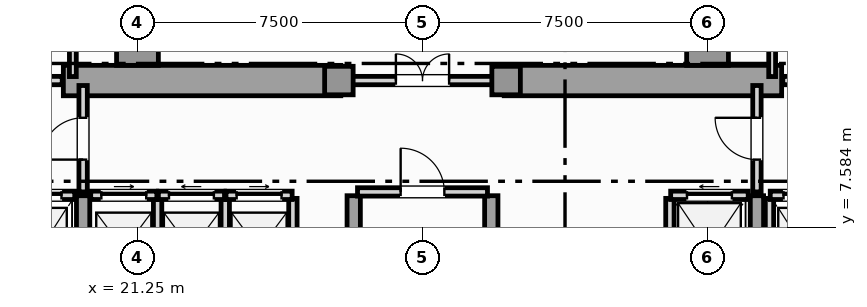
"""IFC4 building model, lengths in metres.
Left out: names, types, materials, properties, quantities, classifications, styles, units other than length and angle.
Written with IfcOpenShell. Run it as: python <this file> out.ifc"""

import sys

from ifc_helpers import new_model, si_unit, direction, frame, frame_2d, origin, origin_2d, place, context, subcontext, project, spatial, rectangle, extrude, element, fill, save


model = new_model("IFC4")
c1 = context("Model", 3, precision=1e-05, world=origin(), true_north=direction((0.0, 1.0)))
c2 = subcontext(c1, "Body", "Model", "MODEL_VIEW")
j1 = project(units=[si_unit("LENGTHUNIT", "METRE"), si_unit("PLANEANGLEUNIT", "RADIAN")], contexts=[c1])
p1 = place(None, origin())
s1 = spatial("IfcSite", under=j1, at=p1, CompositionType="ELEMENT")
p2 = place(p1, origin())
s2 = spatial("IfcBuilding", under=s1, at=p2, CompositionType="ELEMENT")
p3 = place(p2, origin())
s3 = spatial("IfcBuildingStorey", under=s2, at=p3, CompositionType="ELEMENT", Elevation=0.0)
for number, where, z_axis, x_axis in (
    (1, (19.3, 11.45, 0.0), (0.0, 0.0, 1.0), (1.0, 0.0, 0.0)),
    (2, (30.9, 11.45, 0.0), (0.0, 0.0, 1.0), (1.0, 0.0, 0.0)),
):
    element("IfcWall", number, at=place(p3, frame(where, z_axis=z_axis, x_axis=x_axis)), inside=s3, PredefinedType="SHEAR", context=c2, shape_type="SweptSolid", body=[
        extrude(rectangle(XDim=7.3, YDim=0.8, at=frame_2d((3.65, 0.0))), origin(), (0.0, 0.0, 1.0), 5.1),
    ])
for number, where, z_axis, x_axis in (
    (3, (19.82, 0.92, 0.0), (0.0, 0.0, 1.0), (0.0, 1.0, 0.0)),
    (4, (26.94, 0.92, 0.0), (0.0, 0.0, 1.0), (0.0, 1.0, 0.0)),
    (5, (30.56, 0.92, 0.0), (0.0, 0.0, 1.0), (0.0, 1.0, 0.0)),
    (6, (37.55, 0.92, 0.0), (0.0, 0.0, 1.0), (0.0, 1.0, 0.0)),
):
    element("IfcWall", number, at=place(p3, frame(where, z_axis=z_axis, x_axis=x_axis)), inside=s3, PredefinedType="SHEAR", context=c2, shape_type="SweptSolid", body=[
        extrude(rectangle(XDim=7.5, YDim=0.35, at=frame_2d((3.75, 0.0))), origin(), (0.0, 0.0, 1.0), 5.1),
    ])
for number, where, z_axis, x_axis in (
    (7, (26.55, 11.45, 0.0), (0.0, 0.0, 1.0), (1.0, 0.0, 0.0)),
    (8, (30.95, 11.45, 0.0), (0.0, 0.0, 1.0), (1.0, 0.0, 0.0)),
):
    element("IfcColumn", number, at=place(p3, frame(where, z_axis=z_axis, x_axis=x_axis)), inside=s3, PredefinedType="COLUMN", context=c2, shape_type="SweptSolid", body=[
        extrude(rectangle(XDim=0.75, YDim=0.75, at=origin_2d()), origin(), (0.0, 0.0, 1.0), 5.4),
    ])
for number, where, z_axis, x_axis in (
    (9, (21.25, 12.4, 0.0), (0.0, 0.0, 1.0), (1.0, 0.0, 0.0)),
    (10, (36.25, 12.4, 0.0), (0.0, 0.0, 1.0), (1.0, 0.0, 0.0)),
):
    element("IfcColumn", number, at=place(p3, frame(where, z_axis=z_axis, x_axis=x_axis)), inside=s3, PredefinedType="COLUMN", context=c2, shape_type="SweptSolid", body=[
        extrude(rectangle(XDim=1.1, YDim=1.1, at=origin_2d()), origin(), (0.0, 0.0, 1.0), 5.4),
    ])
p4 = place(p3, frame((17.78, 8.43, 0.0), z_axis=(0.0, 0.0, 1.0), x_axis=(1.0, 0.0, 0.0)))
e11 = element("IfcWall", 11, at=p4, inside=s3, PredefinedType="SOLIDWALL", context=c2, shape_type="SweptSolid", body=[
    extrude(rectangle(XDim=1.82, YDim=0.22, at=frame_2d((0.91, 0.0))), origin(), (0.0, 0.0, 1.0), 5.1),
])
p5 = place(p4, frame((0.35, 0.0, 0.0)))
e12 = element("IfcOpeningElement", 12, at=p5, cuts=e11, PredefinedType="OPENING", context=c2, shape_type="SweptSolid", body=[
    extrude(rectangle(XDim=1.12, YDim=2.25, at=frame_2d((0.56, 1.125))), frame((0.0, 0.12, 0.0), z_axis=(0.0, -1.0, 0.0), x_axis=(1.0, 0.0, 0.0)), (0.0, 0.0, 1.0), 0.24),
])
p6 = place(p3, frame((37.88, 5.65, 0.0), z_axis=(0.0, 0.0, 1.0), x_axis=(0.0, 1.0, 0.0)))
e13 = element("IfcWall", 13, at=p6, inside=s3, PredefinedType="SOLIDWALL", context=c2, shape_type="SweptSolid", body=[
    extrude(rectangle(XDim=2.7, YDim=0.22, at=frame_2d((1.35, 0.0))), origin(), (0.0, 0.0, 1.0), 5.1),
])
p7 = place(p3, frame((37.9, 8.43, 0.0), z_axis=(0.0, 0.0, 1.0), x_axis=(1.0, 0.0, 0.0)))
e14 = element("IfcWall", 14, at=p7, inside=s3, PredefinedType="SOLIDWALL", context=c2, shape_type="SweptSolid", body=[
    extrude(rectangle(XDim=1.82, YDim=0.22, at=frame_2d((0.91, 0.0))), origin(), (0.0, 0.0, 1.0), 5.1),
])
p8 = place(p7, frame((0.35, 0.0, 0.0)))
e15 = element("IfcOpeningElement", 15, at=p8, cuts=e14, PredefinedType="OPENING", context=c2, shape_type="SweptSolid", body=[
    extrude(rectangle(XDim=1.12, YDim=2.25, at=frame_2d((0.56, 1.125))), frame((0.0, 0.12, 0.0), z_axis=(0.0, -1.0, 0.0), x_axis=(1.0, 0.0, 0.0)), (0.0, 0.0, 1.0), 0.24),
])
p9 = place(p3, frame((35.26, 5.65, 0.0), z_axis=(0.0, 0.0, 1.0), x_axis=(0.0, 1.0, 0.0)))
e16 = element("IfcWall", 16, at=p9, inside=s3, PredefinedType="SOLIDWALL", context=c2, shape_type="SweptSolid", body=[
    extrude(rectangle(XDim=2.7, YDim=0.22, at=frame_2d((1.35, 0.0))), origin(), (0.0, 0.0, 1.0), 5.1),
])
p10 = place(p3, frame((35.28, 8.43, 0.0), z_axis=(0.0, 0.0, 1.0), x_axis=(1.0, 0.0, 0.0)))
e17 = element("IfcWall", 17, at=p10, inside=s3, PredefinedType="SOLIDWALL", context=c2, shape_type="SweptSolid", body=[
    extrude(rectangle(XDim=2.04, YDim=0.22, at=frame_2d((1.02, 0.0))), origin(), (0.0, 0.0, 1.0), 5.1),
])
p11 = place(p10, frame((0.43, 0.0, 0.0)))
e18 = element("IfcOpeningElement", 18, at=p11, cuts=e17, PredefinedType="OPENING", context=c2, shape_type="SweptSolid", body=[
    extrude(rectangle(XDim=1.18, YDim=2.2, at=frame_2d((0.59, 1.1))), frame((0.0, 0.12, 0.0), z_axis=(0.0, -1.0, 0.0), x_axis=(1.0, 0.0, 0.0)), (0.0, 0.0, 1.0), 0.24),
])
p12 = place(p3, frame((21.78, 5.65, 0.0), z_axis=(0.0, 0.0, 1.0), x_axis=(0.0, 1.0, 0.0)))
e19 = element("IfcWall", 19, at=p12, inside=s3, PredefinedType="SOLIDWALL", context=c2, shape_type="SweptSolid", body=[
    extrude(rectangle(XDim=2.7, YDim=0.22, at=frame_2d((1.35, 0.0))), origin(), (0.0, 0.0, 1.0), 5.1),
])
p13 = place(p3, frame((20.02, 8.43, 0.0), z_axis=(0.0, 0.0, 1.0), x_axis=(1.0, 0.0, 0.0)))
e20 = element("IfcWall", 20, at=p13, inside=s3, PredefinedType="SOLIDWALL", context=c2, shape_type="SweptSolid", body=[
    extrude(rectangle(XDim=1.74, YDim=0.22, at=frame_2d((0.87, 0.0))), origin(), (0.0, 0.0, 1.0), 5.1),
])
p14 = place(p13, frame((0.28, 0.0, 0.0)))
e21 = element("IfcOpeningElement", 21, at=p14, cuts=e20, PredefinedType="OPENING", context=c2, shape_type="SweptSolid", body=[
    extrude(rectangle(XDim=1.18, YDim=2.2, at=frame_2d((0.59, 1.1))), frame((0.0, 0.12, 0.0), z_axis=(0.0, -1.0, 0.0), x_axis=(1.0, 0.0, 0.0)), (0.0, 0.0, 1.0), 0.24),
])
p15 = place(p3, frame((23.56, 5.65, 0.0), z_axis=(0.0, 0.0, 1.0), x_axis=(0.0, 1.0, 0.0)))
e22 = element("IfcWall", 22, at=p15, inside=s3, PredefinedType="SOLIDWALL", context=c2, shape_type="SweptSolid", body=[
    extrude(rectangle(XDim=2.7, YDim=0.22, at=frame_2d((1.35, 0.0))), origin(), (0.0, 0.0, 1.0), 5.1),
])
p16 = place(p3, frame((21.8, 8.43, 0.0), z_axis=(0.0, 0.0, 1.0), x_axis=(1.0, 0.0, 0.0)))
e23 = element("IfcWall", 23, at=p16, inside=s3, PredefinedType="SOLIDWALL", context=c2, shape_type="SweptSolid", body=[
    extrude(rectangle(XDim=1.74, YDim=0.22, at=frame_2d((0.87, 0.0))), origin(), (0.0, 0.0, 1.0), 5.1),
])
p17 = place(p16, frame((0.28, 0.0, 0.0)))
e24 = element("IfcOpeningElement", 24, at=p17, cuts=e23, PredefinedType="OPENING", context=c2, shape_type="SweptSolid", body=[
    extrude(rectangle(XDim=1.18, YDim=2.2, at=frame_2d((0.59, 1.1))), frame((0.0, 0.12, 0.0), z_axis=(0.0, -1.0, 0.0), x_axis=(1.0, 0.0, 0.0)), (0.0, 0.0, 1.0), 0.24),
])
p18 = place(p3, frame((25.34, 5.65, 0.0), z_axis=(0.0, 0.0, 1.0), x_axis=(0.0, 1.0, 0.0)))
e25 = element("IfcWall", 25, at=p18, inside=s3, PredefinedType="SOLIDWALL", context=c2, shape_type="SweptSolid", body=[
    extrude(rectangle(XDim=2.7, YDim=0.22, at=frame_2d((1.35, 0.0))), origin(), (0.0, 0.0, 1.0), 5.1),
])
p19 = place(p3, frame((23.58, 8.43, 0.0), z_axis=(0.0, 0.0, 1.0), x_axis=(1.0, 0.0, 0.0)))
e26 = element("IfcWall", 26, at=p19, inside=s3, PredefinedType="SOLIDWALL", context=c2, shape_type="SweptSolid", body=[
    extrude(rectangle(XDim=1.74, YDim=0.22, at=frame_2d((0.87, 0.0))), origin(), (0.0, 0.0, 1.0), 5.1),
])
p20 = place(p19, frame((0.28, 0.0, 0.0)))
e27 = element("IfcOpeningElement", 27, at=p20, cuts=e26, PredefinedType="OPENING", context=c2, shape_type="SweptSolid", body=[
    extrude(rectangle(XDim=1.18, YDim=2.2, at=frame_2d((0.59, 1.1))), frame((0.0, 0.12, 0.0), z_axis=(0.0, -1.0, 0.0), x_axis=(1.0, 0.0, 0.0)), (0.0, 0.0, 1.0), 0.24),
])
p21 = place(p3, frame((27.04, 8.52, 0.0), z_axis=(0.0, 0.0, 1.0), x_axis=(1.0, 0.0, 0.0)))
e28 = element("IfcWall", 28, at=p21, inside=s3, PredefinedType="SOLIDWALL", context=c2, shape_type="SweptSolid", body=[
    extrude(rectangle(XDim=3.42, YDim=0.22, at=frame_2d((1.71, 0.0))), origin(), (0.0, 0.0, 1.0), 5.1),
])
p22 = place(p21, frame((1.135, 0.0, 0.0)))
e29 = element("IfcOpeningElement", 29, at=p22, cuts=e28, PredefinedType="OPENING", context=c2, shape_type="SweptSolid", body=[
    extrude(rectangle(XDim=1.15, YDim=2.2, at=frame_2d((0.575, 1.1))), frame((0.0, 0.12, 0.0), z_axis=(0.0, -1.0, 0.0), x_axis=(1.0, 0.0, 0.0)), (0.0, 0.0, 1.0), 0.24),
])
p23 = place(p3, frame((19.82, 8.52, 0.0), z_axis=(0.0, 0.0, 1.0), x_axis=(0.0, 1.0, 0.0)))
e30 = element("IfcWall", 30, at=p23, inside=s3, PredefinedType="SOLIDWALL", context=c2, shape_type="SweptSolid", body=[
    extrude(rectangle(XDim=2.8, YDim=0.22, at=frame_2d((1.4, 0.0))), origin(), (0.0, 0.0, 1.0), 4.555),
])
p24 = place(p23, frame((0.85, 0.0, 0.0)))
e31 = element("IfcOpeningElement", 31, at=p24, cuts=e30, PredefinedType="OPENING", context=c2, shape_type="SweptSolid", body=[
    extrude(rectangle(XDim=1.1, YDim=2.2, at=frame_2d((0.55, 1.1))), frame((0.0, 0.12, 0.0), z_axis=(0.0, -1.0, 0.0), x_axis=(1.0, 0.0, 0.0)), (0.0, 0.0, 1.0), 0.24),
])
p25 = place(p3, frame((37.55, 8.52, 0.0), z_axis=(0.0, 0.0, 1.0), x_axis=(0.0, 1.0, 0.0)))
e32 = element("IfcWall", 32, at=p25, inside=s3, PredefinedType="SOLIDWALL", context=c2, shape_type="SweptSolid", body=[
    extrude(rectangle(XDim=2.8, YDim=0.22, at=frame_2d((1.4, 0.0))), origin(), (0.0, 0.0, 1.0), 4.555),
])
p26 = place(p25, frame((0.85, 0.0, 0.0)))
e33 = element("IfcOpeningElement", 33, at=p26, cuts=e32, PredefinedType="OPENING", context=c2, shape_type="SweptSolid", body=[
    extrude(rectangle(XDim=1.1, YDim=2.2, at=frame_2d((0.55, 1.1))), frame((0.0, 0.12, 0.0), z_axis=(0.0, -1.0, 0.0), x_axis=(1.0, 0.0, 0.0)), (0.0, 0.0, 1.0), 0.24),
])
p27 = place(p3, frame((16.23, 11.45, 0.0), z_axis=(0.0, 0.0, 1.0), x_axis=(1.0, 0.0, 0.0)))
e34 = element("IfcWall", 34, at=p27, inside=s3, PredefinedType="SOLIDWALL", context=c2, shape_type="SweptSolid", body=[
    extrude(rectangle(XDim=3.04, YDim=0.22, at=frame_2d((1.52, 0.0))), origin(), (0.0, 0.0, 1.0), 5.1),
])
p28 = place(p27, frame((0.97, 0.0, 0.0)))
e35 = element("IfcOpeningElement", 35, at=p28, cuts=e34, PredefinedType="OPENING", context=c2, shape_type="SweptSolid", body=[
    extrude(rectangle(XDim=1.1, YDim=2.2, at=frame_2d((0.55, 1.1))), frame((0.0, 0.12, 0.0), z_axis=(0.0, -1.0, 0.0), x_axis=(1.0, 0.0, 0.0)), (0.0, 0.0, 1.0), 0.24),
])
p29 = place(p3, frame((26.63, 11.45, 0.0), z_axis=(0.0, 0.0, 1.0), x_axis=(1.0, 0.0, 0.0)))
e36 = element("IfcWall", 36, at=p29, inside=s3, PredefinedType="SOLIDWALL", context=c2, shape_type="SweptSolid", body=[
    extrude(rectangle(XDim=4.24, YDim=0.22, at=frame_2d((2.12, 0.0))), origin(), (0.0, 0.0, 1.0), 5.1),
])
p30 = place(p29, frame((1.42, 0.0, 0.0)))
e37 = element("IfcOpeningElement", 37, at=p30, cuts=e36, PredefinedType="OPENING", context=c2, shape_type="SweptSolid", body=[
    extrude(rectangle(XDim=1.4, YDim=2.2, at=frame_2d((0.7, 1.1))), frame((0.0, 0.12, 0.0), z_axis=(0.0, -1.0, 0.0), x_axis=(1.0, 0.0, 0.0)), (0.0, 0.0, 1.0), 0.24),
])
p31 = place(p3, frame((38.23, 11.45, 0.0), z_axis=(0.0, 0.0, 1.0), x_axis=(1.0, 0.0, 0.0)))
e38 = element("IfcWall", 38, at=p31, inside=s3, PredefinedType="SOLIDWALL", context=c2, shape_type="SweptSolid", body=[
    extrude(rectangle(XDim=3.04, YDim=0.22, at=frame_2d((1.52, 0.0))), origin(), (0.0, 0.0, 1.0), 5.1),
])
p32 = place(p31, frame((0.97, 0.0, 0.0)))
e39 = element("IfcOpeningElement", 39, at=p32, cuts=e38, PredefinedType="OPENING", context=c2, shape_type="SweptSolid", body=[
    extrude(rectangle(XDim=1.1, YDim=2.2, at=frame_2d((0.55, 1.1))), frame((0.0, 0.12, 0.0), z_axis=(0.0, -1.0, 0.0), x_axis=(1.0, 0.0, 0.0)), (0.0, 0.0, 1.0), 0.24),
])
for number, where, z_axis, x_axis in (
    (40, (19.55, 11.555, 0.0), (0.0, 0.0, 1.0), (0.0, 1.0, 0.0)),
    (41, (37.95, 11.555, 0.0), (0.0, 0.0, 1.0), (0.0, 1.0, 0.0)),
):
    element("IfcWall", number, at=place(p3, frame(where, z_axis=z_axis, x_axis=x_axis)), inside=s3, PredefinedType="PARTITIONING", context=c2, shape_type="SweptSolid", body=[
        extrude(rectangle(XDim=3.39, YDim=0.18, at=frame_2d((1.695, 0.0))), origin(), (0.0, 0.0, 1.0), 5.1),
    ])
p33 = place(p5, origin())
e42 = element("IfcDoor", 42, at=p33, inside=s3, OperationType="SLIDING_TO_LEFT", PredefinedType="DOOR", context=c2, shape_type="SweptSolid", body=[
    extrude(rectangle(XDim=1.12, YDim=2.25, at=frame_2d((0.56, 1.125))), frame((0.0, 0.025, 0.0), z_axis=(0.0, -1.0, 0.0), x_axis=(1.0, 0.0, 0.0)), (0.0, 0.0, 1.0), 0.05),
])
fill(e12, e42)
p34 = place(p8, origin())
e43 = element("IfcDoor", 43, at=p34, inside=s3, OperationType="SLIDING_TO_RIGHT", PredefinedType="DOOR", context=c2, shape_type="SweptSolid", body=[
    extrude(rectangle(XDim=1.12, YDim=2.25, at=frame_2d((0.56, 1.125))), frame((0.0, 0.025, 0.0), z_axis=(0.0, -1.0, 0.0), x_axis=(1.0, 0.0, 0.0)), (0.0, 0.0, 1.0), 0.05),
])
fill(e15, e43)
p35 = place(p11, origin())
e44 = element("IfcDoor", 44, at=p35, inside=s3, OperationType="SLIDING_TO_LEFT", PredefinedType="DOOR", context=c2, shape_type="SweptSolid", body=[
    extrude(rectangle(XDim=1.18, YDim=2.2, at=frame_2d((0.59, 1.1))), frame((0.0, 0.025, 0.0), z_axis=(0.0, -1.0, 0.0), x_axis=(1.0, 0.0, 0.0)), (0.0, 0.0, 1.0), 0.05),
])
fill(e18, e44)
p36 = place(p14, origin())
e45 = element("IfcDoor", 45, at=p36, inside=s3, OperationType="SLIDING_TO_RIGHT", PredefinedType="DOOR", context=c2, shape_type="SweptSolid", body=[
    extrude(rectangle(XDim=1.18, YDim=2.2, at=frame_2d((0.59, 1.1))), frame((0.0, 0.025, 0.0), z_axis=(0.0, -1.0, 0.0), x_axis=(1.0, 0.0, 0.0)), (0.0, 0.0, 1.0), 0.05),
])
fill(e21, e45)
p37 = place(p17, origin())
e46 = element("IfcDoor", 46, at=p37, inside=s3, OperationType="SLIDING_TO_LEFT", PredefinedType="DOOR", context=c2, shape_type="SweptSolid", body=[
    extrude(rectangle(XDim=1.18, YDim=2.2, at=frame_2d((0.59, 1.1))), frame((0.0, 0.025, 0.0), z_axis=(0.0, -1.0, 0.0), x_axis=(1.0, 0.0, 0.0)), (0.0, 0.0, 1.0), 0.05),
])
fill(e24, e46)
p38 = place(p20, origin())
e47 = element("IfcDoor", 47, at=p38, inside=s3, OperationType="SLIDING_TO_RIGHT", PredefinedType="DOOR", context=c2, shape_type="SweptSolid", body=[
    extrude(rectangle(XDim=1.18, YDim=2.2, at=frame_2d((0.59, 1.1))), frame((0.0, 0.025, 0.0), z_axis=(0.0, -1.0, 0.0), x_axis=(1.0, 0.0, 0.0)), (0.0, 0.0, 1.0), 0.05),
])
fill(e27, e47)
p39 = place(p22, origin())
e48 = element("IfcDoor", 48, at=p39, inside=s3, OperationType="SINGLE_SWING_LEFT", PredefinedType="DOOR", context=c2, shape_type="SweptSolid", body=[
    extrude(rectangle(XDim=1.15, YDim=2.2, at=frame_2d((0.575, 1.1))), frame((0.0, 0.025, 0.0), z_axis=(0.0, -1.0, 0.0), x_axis=(1.0, 0.0, 0.0)), (0.0, 0.0, 1.0), 0.05),
])
fill(e29, e48)
p40 = place(p24, origin())
e49 = element("IfcDoor", 49, at=p40, inside=s3, OperationType="SINGLE_SWING_LEFT", PredefinedType="DOOR", context=c2, shape_type="SweptSolid", body=[
    extrude(rectangle(XDim=1.1, YDim=2.2, at=frame_2d((0.55, 1.1))), frame((0.0, 0.025, 0.0), z_axis=(0.0, -1.0, 0.0), x_axis=(1.0, 0.0, 0.0)), (0.0, 0.0, 1.0), 0.05),
])
fill(e31, e49)
p41 = place(p26, origin())
e50 = element("IfcDoor", 50, at=p41, inside=s3, OperationType="SINGLE_SWING_RIGHT", PredefinedType="DOOR", context=c2, shape_type="SweptSolid", body=[
    extrude(rectangle(XDim=1.1, YDim=2.2, at=frame_2d((0.55, 1.1))), frame((0.0, 0.025, 0.0), z_axis=(0.0, -1.0, 0.0), x_axis=(1.0, 0.0, 0.0)), (0.0, 0.0, 1.0), 0.05),
])
fill(e33, e50)
p42 = place(p30, origin())
e51 = element("IfcDoor", 51, at=p42, inside=s3, OperationType="DOUBLE_DOOR_SINGLE_SWING", PredefinedType="DOOR", context=c2, shape_type="SweptSolid", body=[
    extrude(rectangle(XDim=1.4, YDim=2.2, at=frame_2d((0.7, 1.1))), frame((0.0, 0.025, 0.0), z_axis=(0.0, -1.0, 0.0), x_axis=(1.0, 0.0, 0.0)), (0.0, 0.0, 1.0), 0.05),
])
fill(e37, e51)
save(model, sys.argv[1])
